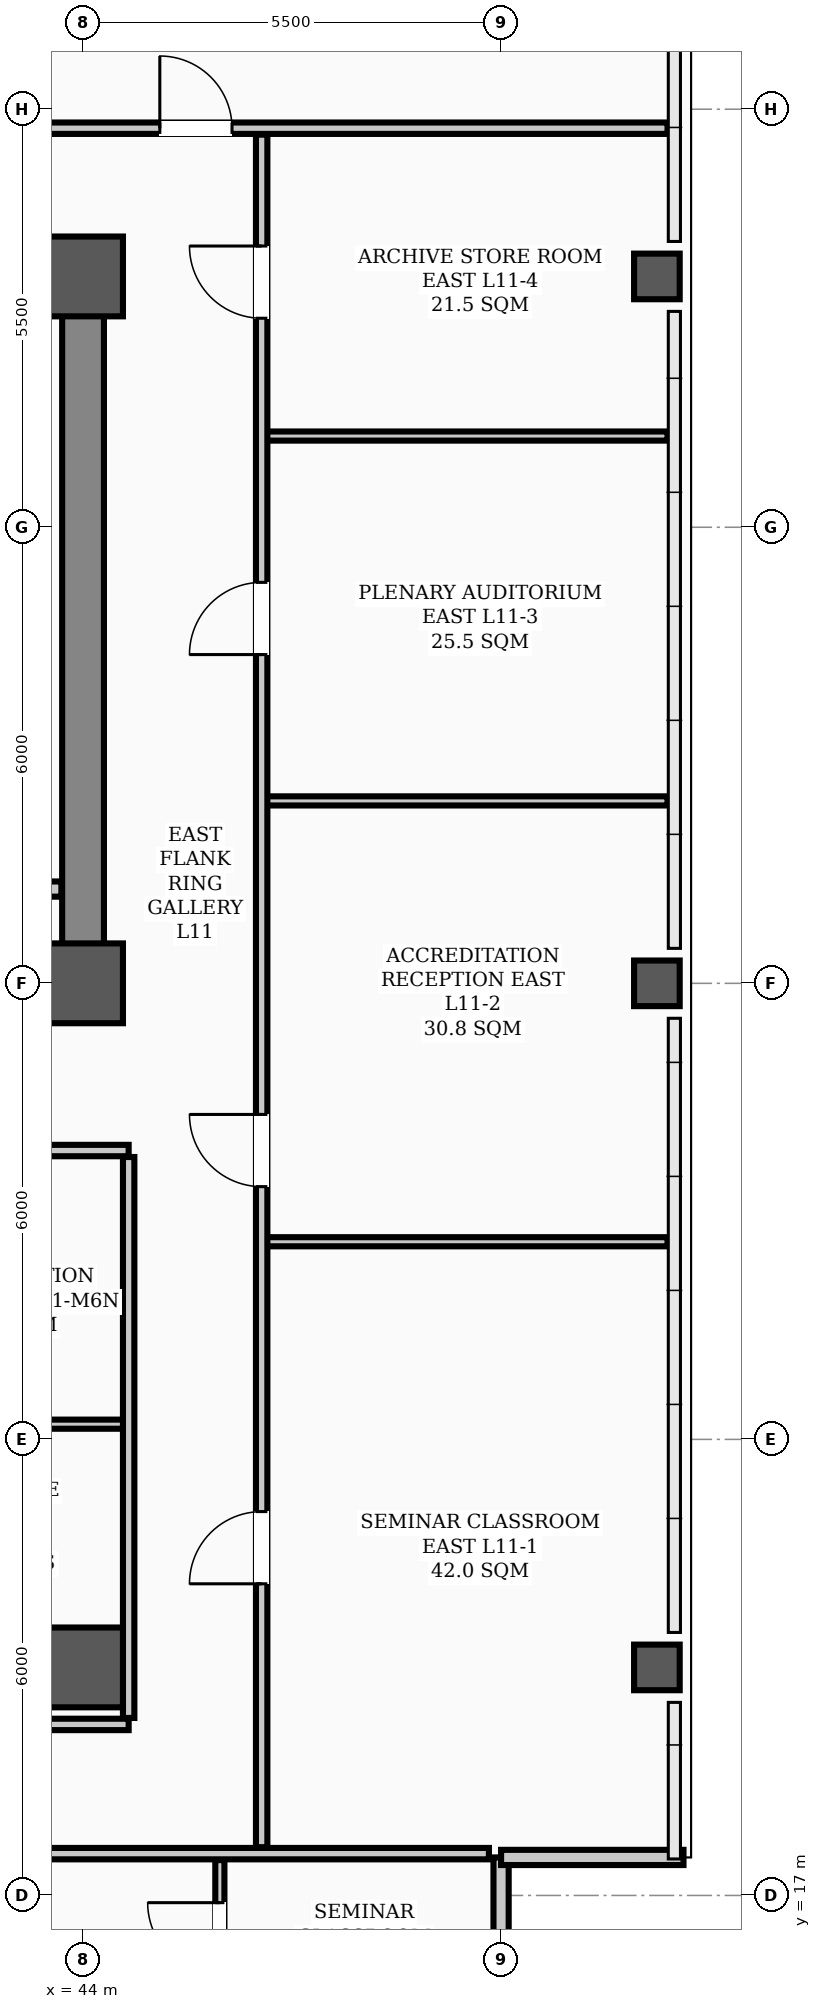
"""IFC4 building model, lengths in metres.
Left out: names, types, materials, properties, quantities, classifications, styles, units other than length and angle.
Written with IfcOpenShell. Run it as: python <this file> out.ifc"""

import sys

from ifc_helpers import new_model, si_unit, direction, frame, frame_2d, origin, origin_2d, place, context, subcontext, project, spatial, rectangle, hollow_rectangle, extrude, element, fill, save


model = new_model("IFC4")
c1 = context("Model", 3, precision=1e-05, world=origin(), true_north=direction((0.0, 1.0)))
c2 = subcontext(c1, "Body", "Model", "MODEL_VIEW")
j1 = project(units=[si_unit("LENGTHUNIT", "METRE"), si_unit("PLANEANGLEUNIT", "RADIAN")], contexts=[c1])
p1 = place(None, origin())
s1 = spatial("IfcSite", under=j1, at=p1, CompositionType="ELEMENT")
p2 = place(p1, origin())
s2 = spatial("IfcBuilding", under=s1, at=p2, CompositionType="ELEMENT")
p3 = place(p2, frame((0.0, 0.0, 46.0)))
s3 = spatial("IfcBuildingStorey", under=s2, at=p3, CompositionType="ELEMENT", Elevation=46.0)
for number, where, z_axis, x_axis in (
    (1, (44.0, 29.0, 0.0), (0.0, 0.0, 1.0), (1.0, 0.0, 0.0)),
    (2, (44.0, 38.3, 0.0), (0.0, 0.0, 1.0), (1.0, 0.0, 0.0)),
    (3, (44.0, 20.0, 0.0), (0.0, 0.0, 1.0), (1.0, 0.0, 0.0)),
):
    element("IfcColumn", number, at=place(p3, frame(where, z_axis=z_axis, x_axis=x_axis)), inside=s3, PredefinedType="COLUMN", context=c2, shape_type="SweptSolid", body=[
        extrude(hollow_rectangle(XDim=1.05, YDim=1.05, WallThickness=0.038, InnerFilletRadius=0.019, OuterFilletRadius=0.057, at=origin_2d()), origin(), (0.0, 0.0, 1.0), 3.9),
    ])
for number, where, z_axis, x_axis in (
    (4, (51.55, 20.0, 0.0), (0.0, 0.0, 1.0), (1.0, 0.0, 0.0)),
    (5, (51.55, 29.0, 0.0), (0.0, 0.0, 1.0), (1.0, 0.0, 0.0)),
    (6, (51.55, 38.3, 0.0), (0.0, 0.0, 1.0), (1.0, 0.0, 0.0)),
):
    element("IfcColumn", number, at=place(p3, frame(where, z_axis=z_axis, x_axis=x_axis)), inside=s3, PredefinedType="COLUMN", context=c2, shape_type="SweptSolid", body=[
        extrude(hollow_rectangle(XDim=0.6, YDim=0.6, WallThickness=0.026, InnerFilletRadius=0.013, OuterFilletRadius=0.039, at=origin_2d()), origin(), (0.0, 0.0, 1.0), 3.9),
    ])
for number, where, z_axis, x_axis in (
    (7, (49.5, 15.1, 0.0), (0.0, 0.0, 1.0), (0.0, 1.0, 0.0)),
    (8, (49.5, 17.5, 0.0), (0.0, 0.0, 1.0), (1.0, 0.0, 0.0)),
):
    element("IfcWall", number, at=place(p3, frame(where, z_axis=z_axis, x_axis=x_axis)), inside=s3, PredefinedType="PARAPET", context=c2, shape_type="SweptSolid", body=[
        extrude(rectangle(XDim=2.4, YDim=0.2, at=frame_2d((1.2, 0.0))), origin(), (0.0, 0.0, 1.0), 1.2),
    ])
p4 = place(p3, frame((13.5, 29.0, 0.0), z_axis=(0.0, 0.0, 1.0), x_axis=(1.0, 0.0, 0.0)))
e9 = element("IfcWall", 9, at=p4, inside=s3, PredefinedType="SHEAR", context=c2, shape_type="SweptSolid", body=[
    extrude(rectangle(XDim=30.5, YDim=0.55, at=frame_2d((15.25, 0.0))), origin(), (0.0, 0.0, 1.0), 3.72),
])
p5 = place(p4, frame((1.75, 0.0, 0.0)))
e10 = element("IfcOpeningElement", 10, at=p5, cuts=e9, PredefinedType="OPENING", context=c2, shape_type="SweptSolid", body=[
    extrude(rectangle(XDim=1.1, YDim=2.08, at=frame_2d((0.55, 1.04))), frame((0.0, 0.285, 0.0), z_axis=(0.0, -1.0, 0.0), x_axis=(1.0, 0.0, 0.0)), (0.0, 0.0, 1.0), 0.57),
])
p6 = place(p4, frame((26.7, 0.0, 0.0)))
e11 = element("IfcOpeningElement", 11, at=p6, cuts=e9, PredefinedType="OPENING", context=c2, shape_type="SweptSolid", body=[
    extrude(rectangle(XDim=1.1, YDim=2.08, at=frame_2d((0.55, 1.04))), frame((0.0, 0.285, 0.0), z_axis=(0.0, -1.0, 0.0), x_axis=(1.0, 0.0, 0.0)), (0.0, 0.0, 1.0), 0.57),
])
p7 = place(p4, frame((6.8, 0.0, 0.0)))
e12 = element("IfcOpeningElement", 12, at=p7, cuts=e9, PredefinedType="OPENING", context=c2, shape_type="SweptSolid", body=[
    extrude(rectangle(XDim=1.1, YDim=2.08, at=frame_2d((0.55, 1.04))), frame((0.0, 0.285, 0.0), z_axis=(0.0, -1.0, 0.0), x_axis=(1.0, 0.0, 0.0)), (0.0, 0.0, 1.0), 0.57),
])
p8 = place(p4, frame((13.2, 0.0, 0.0)))
e13 = element("IfcOpeningElement", 13, at=p8, cuts=e9, PredefinedType="OPENING", context=c2, shape_type="SweptSolid", body=[
    extrude(rectangle(XDim=1.6, YDim=2.08, at=frame_2d((0.8, 1.04))), frame((0.0, 0.285, 0.0), z_axis=(0.0, -1.0, 0.0), x_axis=(1.0, 0.0, 0.0)), (0.0, 0.0, 1.0), 0.57),
])
p9 = place(p4, frame((19.6, 0.0, 0.0)))
e14 = element("IfcOpeningElement", 14, at=p9, cuts=e9, PredefinedType="OPENING", context=c2, shape_type="SweptSolid", body=[
    extrude(rectangle(XDim=0.9, YDim=2.08, at=frame_2d((0.45, 1.04))), frame((0.0, 0.285, 0.0), z_axis=(0.0, -1.0, 0.0), x_axis=(1.0, 0.0, 0.0)), (0.0, 0.0, 1.0), 0.57),
])
p10 = place(p4, frame((21.6, 0.0, 0.0)))
e15 = element("IfcOpeningElement", 15, at=p10, cuts=e9, PredefinedType="OPENING", context=c2, shape_type="SweptSolid", body=[
    extrude(rectangle(XDim=0.9, YDim=2.08, at=frame_2d((0.45, 1.04))), frame((0.0, 0.285, 0.0), z_axis=(0.0, -1.0, 0.0), x_axis=(1.0, 0.0, 0.0)), (0.0, 0.0, 1.0), 0.57),
])
p11 = place(p3, frame((13.5, 38.3, 0.0), z_axis=(0.0, 0.0, 1.0), x_axis=(1.0, 0.0, 0.0)))
e16 = element("IfcWall", 16, at=p11, inside=s3, PredefinedType="SHEAR", context=c2, shape_type="SweptSolid", body=[
    extrude(rectangle(XDim=30.5, YDim=0.55, at=frame_2d((15.25, 0.0))), origin(), (0.0, 0.0, 1.0), 3.72),
])
p12 = place(p3, frame((44.0, 29.35, 0.0), z_axis=(0.0, 0.0, 1.0), x_axis=(0.0, 1.0, 0.0)))
e17 = element("IfcWall", 17, at=p12, inside=s3, PredefinedType="SHEAR", context=c2, shape_type="SweptSolid", body=[
    extrude(rectangle(XDim=8.6, YDim=0.55, at=frame_2d((4.3, 0.0))), origin(), (0.0, 0.0, 1.0), 3.72),
])
p13 = place(p3, frame((42.4, 30.24, 0.0), z_axis=(0.0, 0.0, 1.0), x_axis=(1.0, 0.0, 0.0)))
e18 = element("IfcWall", 18, at=p13, inside=s3, PredefinedType="STANDARD", context=c2, shape_type="SweptSolid", body=[
    extrude(rectangle(XDim=1.315, YDim=0.2, at=frame_2d((0.658, 0.0))), origin(), (0.0, 0.0, 1.0), 3.1),
])
p14 = place(p3, frame((12.9, 26.8, 0.0), z_axis=(0.0, 0.0, 1.0), x_axis=(1.0, 0.0, 0.0)))
e19 = element("IfcWall", 19, at=p14, inside=s3, PredefinedType="PARTITIONING", context=c2, shape_type="SweptSolid", body=[
    extrude(rectangle(XDim=31.7, YDim=0.15, at=frame_2d((15.85, 0.0))), origin(), (0.0, 0.0, 1.0), 3.1),
])
p15 = place(p14, frame((13.6, 0.0, 0.0)))
e20 = element("IfcOpeningElement", 20, at=p15, cuts=e19, PredefinedType="OPENING", context=c2, shape_type="SweptSolid", body=[
    extrude(rectangle(XDim=1.6, YDim=2.08, at=frame_2d((0.8, 1.04))), frame((0.0, 0.085, 0.0), z_axis=(0.0, -1.0, 0.0), x_axis=(1.0, 0.0, 0.0)), (0.0, 0.0, 1.0), 0.17),
])
p16 = place(p14, frame((2.175, 0.0, 0.0)))
e21 = element("IfcOpeningElement", 21, at=p16, cuts=e19, PredefinedType="OPENING", context=c2, shape_type="SweptSolid", body=[
    extrude(rectangle(XDim=0.95, YDim=2.08, at=frame_2d((0.475, 1.04))), frame((0.0, 0.085, 0.0), z_axis=(0.0, -1.0, 0.0), x_axis=(1.0, 0.0, 0.0)), (0.0, 0.0, 1.0), 0.17),
])
p17 = place(p14, frame((6.925, 0.0, 0.0)))
e22 = element("IfcOpeningElement", 22, at=p17, cuts=e19, PredefinedType="OPENING", context=c2, shape_type="SweptSolid", body=[
    extrude(rectangle(XDim=0.95, YDim=2.08, at=frame_2d((0.475, 1.04))), frame((0.0, 0.085, 0.0), z_axis=(0.0, -1.0, 0.0), x_axis=(1.0, 0.0, 0.0)), (0.0, 0.0, 1.0), 0.17),
])
p18 = place(p14, frame((10.925, 0.0, 0.0)))
e23 = element("IfcOpeningElement", 23, at=p18, cuts=e19, PredefinedType="OPENING", context=c2, shape_type="SweptSolid", body=[
    extrude(rectangle(XDim=0.95, YDim=2.08, at=frame_2d((0.475, 1.04))), frame((0.0, 0.085, 0.0), z_axis=(0.0, -1.0, 0.0), x_axis=(1.0, 0.0, 0.0)), (0.0, 0.0, 1.0), 0.17),
])
p19 = place(p14, frame((16.025, 0.0, 0.0)))
e24 = element("IfcOpeningElement", 24, at=p19, cuts=e19, PredefinedType="OPENING", context=c2, shape_type="SweptSolid", body=[
    extrude(rectangle(XDim=0.95, YDim=2.08, at=frame_2d((0.475, 1.04))), frame((0.0, 0.085, 0.0), z_axis=(0.0, -1.0, 0.0), x_axis=(1.0, 0.0, 0.0)), (0.0, 0.0, 1.0), 0.17),
])
p20 = place(p14, frame((21.725, 0.0, 0.0)))
e25 = element("IfcOpeningElement", 25, at=p20, cuts=e19, PredefinedType="OPENING", context=c2, shape_type="SweptSolid", body=[
    extrude(rectangle(XDim=0.95, YDim=2.08, at=frame_2d((0.475, 1.04))), frame((0.0, 0.085, 0.0), z_axis=(0.0, -1.0, 0.0), x_axis=(1.0, 0.0, 0.0)), (0.0, 0.0, 1.0), 0.17),
])
p21 = place(p14, frame((27.925, 0.0, 0.0)))
e26 = element("IfcOpeningElement", 26, at=p21, cuts=e19, PredefinedType="OPENING", context=c2, shape_type="SweptSolid", body=[
    extrude(rectangle(XDim=0.95, YDim=2.08, at=frame_2d((0.475, 1.04))), frame((0.0, 0.085, 0.0), z_axis=(0.0, -1.0, 0.0), x_axis=(1.0, 0.0, 0.0)), (0.0, 0.0, 1.0), 0.17),
])
p22 = place(p3, frame((4.66, 17.55, 0.0), z_axis=(0.0, 0.0, 1.0), x_axis=(1.0, 0.0, 0.0)))
e27 = element("IfcWall", 27, at=p22, inside=s3, PredefinedType="PARTITIONING", context=c2, shape_type="SweptSolid", body=[
    extrude(rectangle(XDim=44.68, YDim=0.15, at=frame_2d((22.34, 0.0))), origin(), (0.0, 0.0, 1.0), 3.1),
])
p23 = place(p22, frame((10.565, 0.0, 0.0)))
e28 = element("IfcOpeningElement", 28, at=p23, cuts=e27, PredefinedType="OPENING", context=c2, shape_type="SweptSolid", body=[
    extrude(rectangle(XDim=0.95, YDim=2.08, at=frame_2d((0.475, 1.04))), frame((0.0, 0.085, 0.0), z_axis=(0.0, -1.0, 0.0), x_axis=(1.0, 0.0, 0.0)), (0.0, 0.0, 1.0), 0.17),
])
p24 = place(p22, frame((16.165, 0.0, 0.0)))
e29 = element("IfcOpeningElement", 29, at=p24, cuts=e27, PredefinedType="OPENING", context=c2, shape_type="SweptSolid", body=[
    extrude(rectangle(XDim=0.95, YDim=2.08, at=frame_2d((0.475, 1.04))), frame((0.0, 0.085, 0.0), z_axis=(0.0, -1.0, 0.0), x_axis=(1.0, 0.0, 0.0)), (0.0, 0.0, 1.0), 0.17),
])
p25 = place(p22, frame((30.565, 0.0, 0.0)))
e30 = element("IfcOpeningElement", 30, at=p25, cuts=e27, PredefinedType="OPENING", context=c2, shape_type="SweptSolid", body=[
    extrude(rectangle(XDim=0.95, YDim=2.08, at=frame_2d((0.475, 1.04))), frame((0.0, 0.085, 0.0), z_axis=(0.0, -1.0, 0.0), x_axis=(1.0, 0.0, 0.0)), (0.0, 0.0, 1.0), 0.17),
])
p26 = place(p22, frame((37.365, 0.0, 0.0)))
e31 = element("IfcOpeningElement", 31, at=p26, cuts=e27, PredefinedType="OPENING", context=c2, shape_type="SweptSolid", body=[
    extrude(rectangle(XDim=0.95, YDim=2.08, at=frame_2d((0.475, 1.04))), frame((0.0, 0.085, 0.0), z_axis=(0.0, -1.0, 0.0), x_axis=(1.0, 0.0, 0.0)), (0.0, 0.0, 1.0), 0.17),
])
p27 = place(p3, frame((28.4, 19.25, 0.0), z_axis=(0.0, 0.0, 1.0), x_axis=(1.0, 0.0, 0.0)))
e32 = element("IfcWall", 32, at=p27, inside=s3, PredefinedType="PARTITIONING", context=c2, shape_type="SweptSolid", body=[
    extrude(rectangle(XDim=16.2, YDim=0.15, at=frame_2d((8.1, 0.0))), origin(), (0.0, 0.0, 1.0), 3.1),
])
p28 = place(p27, frame((0.525, 0.0, 0.0)))
e33 = element("IfcOpeningElement", 33, at=p28, cuts=e32, PredefinedType="OPENING", context=c2, shape_type="SweptSolid", body=[
    extrude(rectangle(XDim=0.95, YDim=2.08, at=frame_2d((0.475, 1.04))), frame((0.0, 0.085, 0.0), z_axis=(0.0, -1.0, 0.0), x_axis=(1.0, 0.0, 0.0)), (0.0, 0.0, 1.0), 0.17),
])
p29 = place(p27, frame((6.225, 0.0, 0.0)))
e34 = element("IfcOpeningElement", 34, at=p29, cuts=e32, PredefinedType="OPENING", context=c2, shape_type="SweptSolid", body=[
    extrude(rectangle(XDim=0.95, YDim=2.08, at=frame_2d((0.475, 1.04))), frame((0.0, 0.085, 0.0), z_axis=(0.0, -1.0, 0.0), x_axis=(1.0, 0.0, 0.0)), (0.0, 0.0, 1.0), 0.17),
])
p30 = place(p27, frame((12.425, 0.0, 0.0)))
e35 = element("IfcOpeningElement", 35, at=p30, cuts=e32, PredefinedType="OPENING", context=c2, shape_type="SweptSolid", body=[
    extrude(rectangle(XDim=0.95, YDim=2.08, at=frame_2d((0.475, 1.04))), frame((0.0, 0.085, 0.0), z_axis=(0.0, -1.0, 0.0), x_axis=(1.0, 0.0, 0.0)), (0.0, 0.0, 1.0), 0.17),
])
p31 = place(p3, frame((38.0, 23.2, 0.0), z_axis=(0.0, 0.0, 1.0), x_axis=(1.0, 0.0, 0.0)))
e36 = element("IfcWall", 36, at=p31, inside=s3, PredefinedType="PARTITIONING", context=c2, shape_type="SweptSolid", body=[
    extrude(rectangle(XDim=6.6, YDim=0.12, at=frame_2d((3.3, 0.0))), origin(), (0.0, 0.0, 1.0), 3.1),
])
for number, where, z_axis, x_axis in (
    (37, (46.35, 25.6, 0.0), (0.0, 0.0, 1.0), (1.0, 0.0, 0.0)),
    (38, (46.35, 31.4, 0.0), (0.0, 0.0, 1.0), (1.0, 0.0, 0.0)),
    (39, (46.35, 36.2, 0.0), (0.0, 0.0, 1.0), (1.0, 0.0, 0.0)),
):
    element("IfcWall", number, at=place(p3, frame(where, z_axis=z_axis, x_axis=x_axis)), inside=s3, PredefinedType="PARTITIONING", context=c2, shape_type="SweptSolid", body=[
        extrude(rectangle(XDim=5.34, YDim=0.12, at=frame_2d((2.67, 0.0))), origin(), (0.0, 0.0, 1.0), 3.212),
    ])
p32 = place(p3, frame((2.31, 40.25, 0.0), z_axis=(0.0, 0.0, 1.0), x_axis=(1.0, 0.0, 0.0)))
e40 = element("IfcWall", 40, at=p32, inside=s3, PredefinedType="PARTITIONING", context=c2, shape_type="SweptSolid", body=[
    extrude(rectangle(XDim=49.38, YDim=0.15, at=frame_2d((24.69, 0.0))), origin(), (0.0, 0.0, 1.0), 3.1),
])
p33 = place(p32, frame((9.23, 0.0, 0.0)))
e41 = element("IfcOpeningElement", 41, at=p33, cuts=e40, PredefinedType="OPENING", context=c2, shape_type="SweptSolid", body=[
    extrude(rectangle(XDim=0.95, YDim=2.08, at=frame_2d((0.475, 1.04))), frame((0.0, 0.085, 0.0), z_axis=(0.0, -1.0, 0.0), x_axis=(1.0, 0.0, 0.0)), (0.0, 0.0, 1.0), 0.17),
])
p34 = place(p32, frame((17.215, 0.0, 0.0)))
e42 = element("IfcOpeningElement", 42, at=p34, cuts=e40, PredefinedType="OPENING", context=c2, shape_type="SweptSolid", body=[
    extrude(rectangle(XDim=0.95, YDim=2.08, at=frame_2d((0.475, 1.04))), frame((0.0, 0.085, 0.0), z_axis=(0.0, -1.0, 0.0), x_axis=(1.0, 0.0, 0.0)), (0.0, 0.0, 1.0), 0.17),
])
p35 = place(p32, frame((24.915, 0.0, 0.0)))
e43 = element("IfcOpeningElement", 43, at=p35, cuts=e40, PredefinedType="OPENING", context=c2, shape_type="SweptSolid", body=[
    extrude(rectangle(XDim=0.95, YDim=2.08, at=frame_2d((0.475, 1.04))), frame((0.0, 0.085, 0.0), z_axis=(0.0, -1.0, 0.0), x_axis=(1.0, 0.0, 0.0)), (0.0, 0.0, 1.0), 0.17),
])
p36 = place(p32, frame((32.815, 0.0, 0.0)))
e44 = element("IfcOpeningElement", 44, at=p36, cuts=e40, PredefinedType="OPENING", context=c2, shape_type="SweptSolid", body=[
    extrude(rectangle(XDim=0.95, YDim=2.08, at=frame_2d((0.475, 1.04))), frame((0.0, 0.085, 0.0), z_axis=(0.0, -1.0, 0.0), x_axis=(1.0, 0.0, 0.0)), (0.0, 0.0, 1.0), 0.17),
])
p37 = place(p32, frame((42.7, 0.0, 0.0)))
e45 = element("IfcOpeningElement", 45, at=p37, cuts=e40, PredefinedType="OPENING", context=c2, shape_type="SweptSolid", body=[
    extrude(rectangle(XDim=0.95, YDim=2.08, at=frame_2d((0.475, 1.04))), frame((0.0, 0.085, 0.0), z_axis=(0.0, -1.0, 0.0), x_axis=(1.0, 0.0, 0.0)), (0.0, 0.0, 1.0), 0.17),
])
p38 = place(p3, frame((46.35, 17.635, 0.0), z_axis=(0.0, 0.0, 1.0), x_axis=(0.0, 1.0, 0.0)))
e46 = element("IfcWall", 46, at=p38, inside=s3, PredefinedType="PARTITIONING", context=c2, shape_type="SweptSolid", body=[
    extrude(rectangle(XDim=22.53, YDim=0.15, at=frame_2d((11.265, 0.0))), origin(), (0.0, 0.0, 1.0), 3.0),
])
p39 = place(p38, frame((3.465, 0.0, 0.0)))
e47 = element("IfcOpeningElement", 47, at=p39, cuts=e46, PredefinedType="OPENING", context=c2, shape_type="SweptSolid", body=[
    extrude(rectangle(XDim=0.95, YDim=2.08, at=frame_2d((0.475, 1.04))), frame((0.0, 0.085, 0.0), z_axis=(0.0, -1.0, 0.0), x_axis=(1.0, 0.0, 0.0)), (0.0, 0.0, 1.0), 0.17),
])
p40 = place(p38, frame((8.69, 0.0, 0.0)))
e48 = element("IfcOpeningElement", 48, at=p40, cuts=e46, PredefinedType="OPENING", context=c2, shape_type="SweptSolid", body=[
    extrude(rectangle(XDim=0.95, YDim=2.08, at=frame_2d((0.475, 1.04))), frame((0.0, 0.085, 0.0), z_axis=(0.0, -1.0, 0.0), x_axis=(1.0, 0.0, 0.0)), (0.0, 0.0, 1.0), 0.17),
])
p41 = place(p38, frame((15.69, 0.0, 0.0)))
e49 = element("IfcOpeningElement", 49, at=p41, cuts=e46, PredefinedType="OPENING", context=c2, shape_type="SweptSolid", body=[
    extrude(rectangle(XDim=0.95, YDim=2.08, at=frame_2d((0.475, 1.04))), frame((0.0, 0.085, 0.0), z_axis=(0.0, -1.0, 0.0), x_axis=(1.0, 0.0, 0.0)), (0.0, 0.0, 1.0), 0.17),
])
p42 = place(p38, frame((20.115, 0.0, 0.0)))
e50 = element("IfcOpeningElement", 50, at=p42, cuts=e46, PredefinedType="OPENING", context=c2, shape_type="SweptSolid", body=[
    extrude(rectangle(XDim=0.95, YDim=2.08, at=frame_2d((0.475, 1.04))), frame((0.0, 0.085, 0.0), z_axis=(0.0, -1.0, 0.0), x_axis=(1.0, 0.0, 0.0)), (0.0, 0.0, 1.0), 0.17),
])
p43 = place(p3, frame((44.6, 19.335, 0.0), z_axis=(0.0, 0.0, 1.0), x_axis=(0.0, 1.0, 0.0)))
e51 = element("IfcWall", 51, at=p43, inside=s3, PredefinedType="PARTITIONING", context=c2, shape_type="SweptSolid", body=[
    extrude(rectangle(XDim=7.38, YDim=0.15, at=frame_2d((3.69, 0.0))), origin(), (0.0, 0.0, 1.0), 3.0),
])
p44 = place(p3, frame((45.8, 15.31, 0.0), z_axis=(0.0, 0.0, 1.0), x_axis=(0.0, 1.0, 0.0)))
e52 = element("IfcWall", 52, at=p44, inside=s3, PredefinedType="PARTITIONING", context=c2, shape_type="SweptSolid", body=[
    extrude(rectangle(XDim=2.155, YDim=0.12, at=frame_2d((1.078, 0.0))), origin(), (0.0, 0.0, 1.0), 3.72),
])
p45 = place(p44, frame((0.645, 0.0, 0.0)))
e53 = element("IfcOpeningElement", 53, at=p45, cuts=e52, PredefinedType="OPENING", context=c2, shape_type="SweptSolid", body=[
    extrude(rectangle(XDim=0.95, YDim=2.08, at=frame_2d((0.475, 1.04))), frame((0.0, 0.07, 0.0), z_axis=(0.0, -1.0, 0.0), x_axis=(1.0, 0.0, 0.0)), (0.0, 0.0, 1.0), 0.14),
])
p46 = place(p45, origin())
e54 = element("IfcDoor", 54, at=p46, inside=s3, OperationType="SINGLE_SWING_RIGHT", PredefinedType="DOOR", context=c2, shape_type="SweptSolid", body=[
    extrude(rectangle(XDim=0.95, YDim=2.08, at=frame_2d((0.475, 1.04))), frame((0.0, 0.025, 0.0), z_axis=(0.0, -1.0, 0.0), x_axis=(1.0, 0.0, 0.0)), (0.0, 0.0, 1.0), 0.05),
])
fill(e53, e54)
p47 = place(p39, origin())
e55 = element("IfcDoor", 55, at=p47, inside=s3, OperationType="SINGLE_SWING_LEFT", PredefinedType="DOOR", context=c2, shape_type="SweptSolid", body=[
    extrude(rectangle(XDim=0.95, YDim=2.08, at=frame_2d((0.475, 1.04))), frame((0.0, 0.025, 0.0), z_axis=(0.0, -1.0, 0.0), x_axis=(1.0, 0.0, 0.0)), (0.0, 0.0, 1.0), 0.05),
])
fill(e47, e55)
p48 = place(p40, origin())
e56 = element("IfcDoor", 56, at=p48, inside=s3, OperationType="SINGLE_SWING_RIGHT", PredefinedType="DOOR", context=c2, shape_type="SweptSolid", body=[
    extrude(rectangle(XDim=0.95, YDim=2.08, at=frame_2d((0.475, 1.04))), frame((0.0, 0.025, 0.0), z_axis=(0.0, -1.0, 0.0), x_axis=(1.0, 0.0, 0.0)), (0.0, 0.0, 1.0), 0.05),
])
fill(e48, e56)
p49 = place(p41, origin())
e57 = element("IfcDoor", 57, at=p49, inside=s3, OperationType="SINGLE_SWING_LEFT", PredefinedType="DOOR", context=c2, shape_type="SweptSolid", body=[
    extrude(rectangle(XDim=0.95, YDim=2.08, at=frame_2d((0.475, 1.04))), frame((0.0, 0.025, 0.0), z_axis=(0.0, -1.0, 0.0), x_axis=(1.0, 0.0, 0.0)), (0.0, 0.0, 1.0), 0.05),
])
fill(e49, e57)
p50 = place(p42, origin())
e58 = element("IfcDoor", 58, at=p50, inside=s3, OperationType="SINGLE_SWING_RIGHT", PredefinedType="DOOR", context=c2, shape_type="SweptSolid", body=[
    extrude(rectangle(XDim=0.95, YDim=2.08, at=frame_2d((0.475, 1.04))), frame((0.0, 0.025, 0.0), z_axis=(0.0, -1.0, 0.0), x_axis=(1.0, 0.0, 0.0)), (0.0, 0.0, 1.0), 0.05),
])
fill(e50, e58)
p51 = place(p37, origin())
e59 = element("IfcDoor", 59, at=p51, inside=s3, OperationType="SINGLE_SWING_LEFT", PredefinedType="DOOR", context=c2, shape_type="SweptSolid", body=[
    extrude(rectangle(XDim=0.95, YDim=2.08, at=frame_2d((0.475, 1.04))), frame((0.0, 0.025, 0.0), z_axis=(0.0, -1.0, 0.0), x_axis=(1.0, 0.0, 0.0)), (0.0, 0.0, 1.0), 0.05),
])
fill(e45, e59)
save(model, sys.argv[1])
